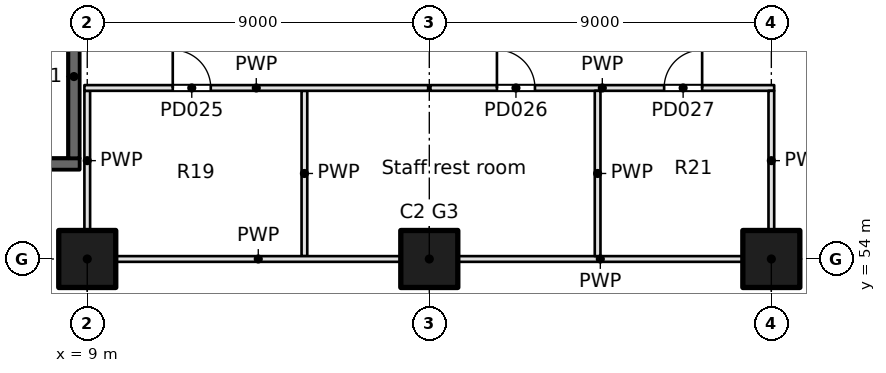
"""IFC4 building model, lengths in metres.
Left out: names, types, materials, properties, quantities, classifications, styles, units other than length and angle.
Written with IfcOpenShell. Run it as: python <this file> out.ifc"""

import sys

from ifc_helpers import new_model, si_unit, direction, frame, frame_2d, origin, origin_2d, place, context, subcontext, project, spatial, rectangle, extrude, element, fill, save


model = new_model("IFC4")
c1 = context("Model", 3, precision=1e-05, world=origin(), true_north=direction((0.0, 1.0)))
c2 = subcontext(c1, "Body", "Model", "MODEL_VIEW")
j1 = project(units=[si_unit("LENGTHUNIT", "METRE"), si_unit("PLANEANGLEUNIT", "RADIAN")], contexts=[c1])
p1 = place(None, origin())
s1 = spatial("IfcSite", under=j1, at=p1, CompositionType="ELEMENT")
p2 = place(p1, origin())
s2 = spatial("IfcBuilding", under=s1, at=p2, CompositionType="ELEMENT")
p3 = place(p2, frame((0.0, 0.0, -6.0)))
s3 = spatial("IfcBuildingStorey", under=s2, at=p3, CompositionType="ELEMENT", Elevation=-6.0)
for number, where, z_axis, x_axis in (
    (1, (9.0, 54.0, -0.6), (0.0, 0.0, 1.0), (1.0, 0.0, 0.0)),
    (2, (18.0, 54.0, -0.6), (0.0, 0.0, 1.0), (1.0, 0.0, 0.0)),
    (3, (27.0, 54.0, -0.6), (0.0, 0.0, 1.0), (1.0, 0.0, 0.0)),
):
    element("IfcColumn", number, at=place(p3, frame(where, z_axis=z_axis, x_axis=x_axis)), inside=s3, PredefinedType="COLUMN", context=c2, shape_type="SweptSolid", body=[
        extrude(rectangle(XDim=1.5, YDim=1.5, at=origin_2d()), origin(), (0.0, 0.0, 1.0), 6.6),
    ])
p4 = place(p3, frame((0.9, 56.5, 0.0), z_axis=(0.0, 0.0, 1.0), x_axis=(1.0, 0.0, 0.0)))
e4 = element("IfcWall", 4, at=p4, inside=s3, PredefinedType="SOLIDWALL", context=c2, shape_type="SweptSolid", body=[
    extrude(rectangle(XDim=7.9, YDim=0.3, at=frame_2d((3.95, 0.0))), origin(), (0.0, 0.0, 1.0), 5.6),
])
p5 = place(p3, frame((8.65, 56.65, 0.0), z_axis=(0.0, 0.0, 1.0), x_axis=(0.0, 1.0, 0.0)))
e5 = element("IfcWall", 5, at=p5, inside=s3, PredefinedType="SOLIDWALL", context=c2, shape_type="SweptSolid", body=[
    extrude(rectangle(XDim=4.3, YDim=0.3, at=frame_2d((2.15, 0.0))), origin(), (0.0, 0.0, 1.0), 5.6),
])
p6 = place(p3, frame((14.714, 54.075, 0.0), z_axis=(0.0, 0.0, 1.0), x_axis=(0.0, 1.0, 0.0)))
e6 = element("IfcWall", 6, at=p6, inside=s3, PredefinedType="PARTITIONING", context=c2, shape_type="SweptSolid", body=[
    extrude(rectangle(XDim=4.35, YDim=0.15, at=frame_2d((2.175, 0.0))), origin(), (0.0, 0.0, 1.0), 5.6),
])
for number, where, z_axis, x_axis in (
    (7, (17.25, 54.0, 0.0), (0.0, 0.0, 1.0), (-1.0, 0.0, 0.0)),
    (8, (26.25, 54.0, 0.0), (0.0, 0.0, 1.0), (-1.0, 0.0, 0.0)),
):
    element("IfcWall", number, at=place(p3, frame(where, z_axis=z_axis, x_axis=x_axis)), inside=s3, PredefinedType="PARTITIONING", context=c2, shape_type="SweptSolid", body=[
        extrude(rectangle(XDim=7.5, YDim=0.15, at=frame_2d((3.75, 0.0))), origin(), (0.0, 0.0, 1.0), 5.6),
    ])
p7 = place(p3, frame((9.0, 54.75, 0.0), z_axis=(0.0, 0.0, 1.0), x_axis=(0.0, 1.0, 0.0)))
e9 = element("IfcWall", 9, at=p7, inside=s3, PredefinedType="PARTITIONING", context=c2, shape_type="SweptSolid", body=[
    extrude(rectangle(XDim=3.675, YDim=0.15, at=frame_2d((1.837, 0.0))), origin(), (0.0, 0.0, 1.0), 5.6),
])
p8 = place(p3, frame((8.925, 58.5, 0.0), z_axis=(0.0, 0.0, 1.0), x_axis=(1.0, 0.0, 0.0)))
e10 = element("IfcWall", 10, at=p8, inside=s3, PredefinedType="PARTITIONING", context=c2, shape_type="SweptSolid", body=[
    extrude(rectangle(XDim=9.045, YDim=0.15, at=frame_2d((4.522, 0.0))), origin(), (0.0, 0.0, 1.0), 5.6),
])
p9 = place(p8, frame((2.325, 0.0, 0.0)))
e11 = element("IfcOpeningElement", 11, at=p9, cuts=e10, PredefinedType="OPENING", context=c2, shape_type="SweptSolid", body=[
    extrude(rectangle(XDim=1.0, YDim=2.1, at=frame_2d((0.5, 1.05))), frame((0.0, 0.075, 0.0), z_axis=(0.0, -1.0, 0.0), x_axis=(1.0, 0.0, 0.0)), (0.0, 0.0, 1.0), 0.15),
])
p10 = place(p3, frame((18.03, 58.5, 0.0), z_axis=(0.0, 0.0, 1.0), x_axis=(1.0, 0.0, 0.0)))
e12 = element("IfcWall", 12, at=p10, inside=s3, PredefinedType="PARTITIONING", context=c2, shape_type="SweptSolid", body=[
    extrude(rectangle(XDim=9.045, YDim=0.15, at=frame_2d((4.522, 0.0))), origin(), (0.0, 0.0, 1.0), 5.6),
])
p11 = place(p10, frame((1.75, 0.0, 0.0)))
e13 = element("IfcOpeningElement", 13, at=p11, cuts=e12, PredefinedType="OPENING", context=c2, shape_type="SweptSolid", body=[
    extrude(rectangle(XDim=1.0, YDim=2.1, at=frame_2d((0.5, 1.05))), frame((0.0, 0.075, 0.0), z_axis=(0.0, -1.0, 0.0), x_axis=(1.0, 0.0, 0.0)), (0.0, 0.0, 1.0), 0.15),
])
p12 = place(p10, frame((6.149, 0.0, 0.0)))
e14 = element("IfcOpeningElement", 14, at=p12, cuts=e12, PredefinedType="OPENING", context=c2, shape_type="SweptSolid", body=[
    extrude(rectangle(XDim=1.0, YDim=2.1, at=frame_2d((0.5, 1.05))), frame((0.0, 0.075, 0.0), z_axis=(0.0, -1.0, 0.0), x_axis=(1.0, 0.0, 0.0)), (0.0, 0.0, 1.0), 0.15),
])
p13 = place(p3, frame((22.429, 54.075, 0.0), z_axis=(0.0, 0.0, 1.0), x_axis=(0.0, 1.0, 0.0)))
e15 = element("IfcWall", 15, at=p13, inside=s3, PredefinedType="PARTITIONING", context=c2, shape_type="SweptSolid", body=[
    extrude(rectangle(XDim=4.35, YDim=0.15, at=frame_2d((2.175, 0.0))), origin(), (0.0, 0.0, 1.0), 5.6),
])
p14 = place(p3, frame((27.0, 58.425, 0.0), z_axis=(0.0, 0.0, 1.0), x_axis=(0.0, -1.0, 0.0)))
e16 = element("IfcWall", 16, at=p14, inside=s3, PredefinedType="PARTITIONING", context=c2, shape_type="SweptSolid", body=[
    extrude(rectangle(XDim=3.675, YDim=0.15, at=frame_2d((1.837, 0.0))), origin(), (0.0, 0.0, 1.0), 5.6),
])
p15 = place(p9, origin())
e17 = element("IfcDoor", 17, at=p15, inside=s3, OperationType="SINGLE_SWING_LEFT", PredefinedType="DOOR", context=c2, shape_type="SweptSolid", body=[
    extrude(rectangle(XDim=1.0, YDim=2.1, at=frame_2d((0.5, 1.05))), frame((0.0, 0.025, 0.0), z_axis=(0.0, -1.0, 0.0), x_axis=(1.0, 0.0, 0.0)), (0.0, 0.0, 1.0), 0.05),
])
fill(e11, e17)
p16 = place(p11, origin())
e18 = element("IfcDoor", 18, at=p16, inside=s3, OperationType="SINGLE_SWING_LEFT", PredefinedType="DOOR", context=c2, shape_type="SweptSolid", body=[
    extrude(rectangle(XDim=1.0, YDim=2.1, at=frame_2d((0.5, 1.05))), frame((0.0, 0.025, 0.0), z_axis=(0.0, -1.0, 0.0), x_axis=(1.0, 0.0, 0.0)), (0.0, 0.0, 1.0), 0.05),
])
fill(e13, e18)
p17 = place(p12, origin())
e19 = element("IfcDoor", 19, at=p17, inside=s3, OperationType="SINGLE_SWING_RIGHT", PredefinedType="DOOR", context=c2, shape_type="SweptSolid", body=[
    extrude(rectangle(XDim=1.0, YDim=2.1, at=frame_2d((0.5, 1.05))), frame((0.0, 0.025, 0.0), z_axis=(0.0, -1.0, 0.0), x_axis=(1.0, 0.0, 0.0)), (0.0, 0.0, 1.0), 0.05),
])
fill(e14, e19)
save(model, sys.argv[1])
